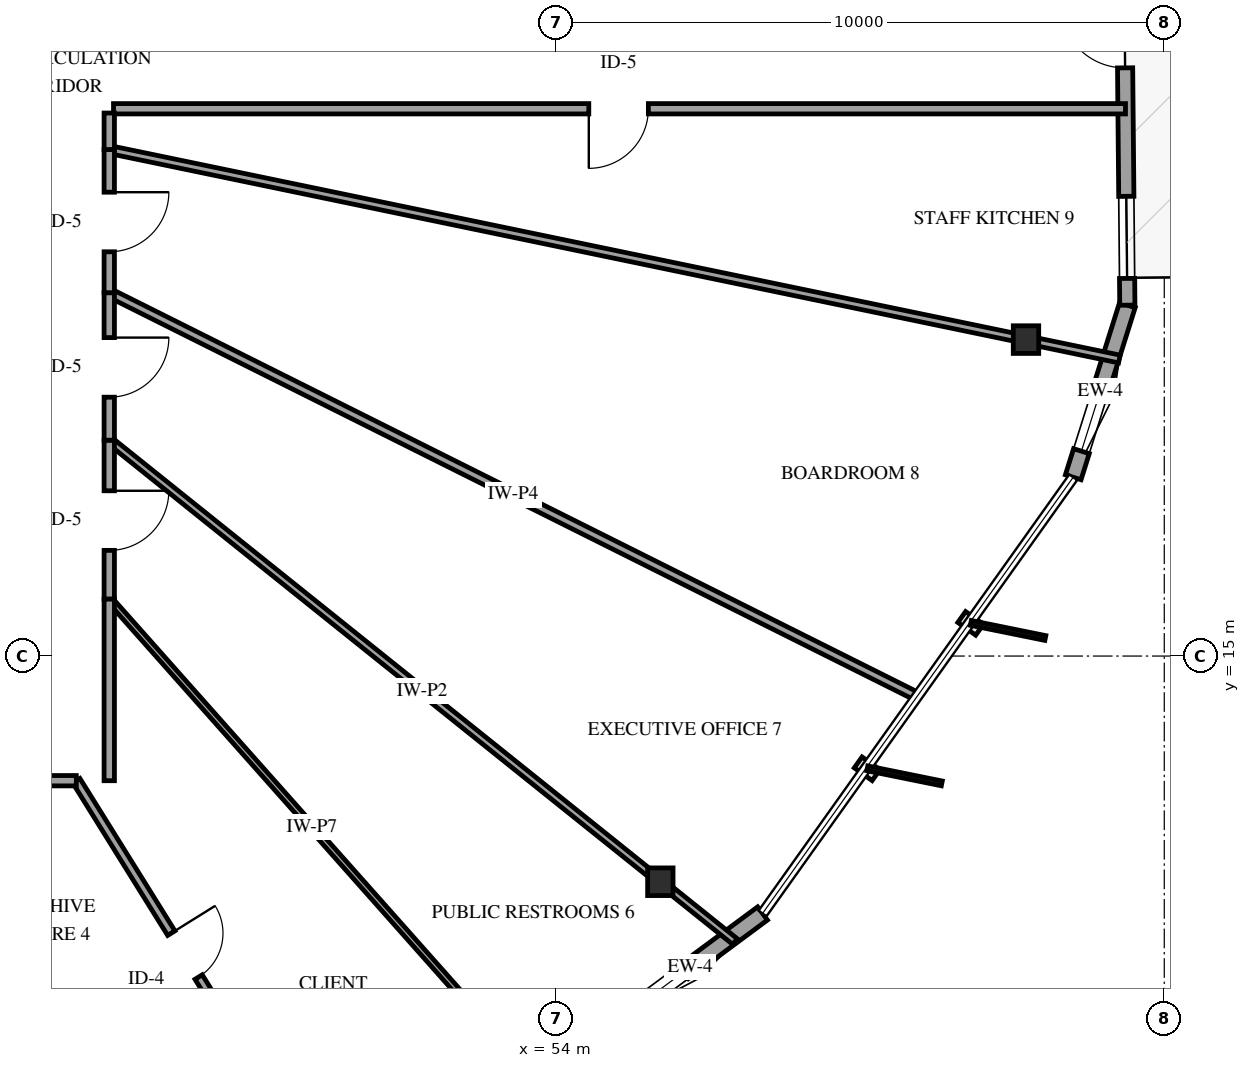
"""IFC4 building model, lengths in metres.
Left out: names, types, materials, properties, quantities, classifications, styles, units other than length and angle.
Written with IfcOpenShell. Run it as: python <this file> out.ifc"""

import sys

from ifc_helpers import new_model, si_unit, direction, frame, frame_2d, origin, origin_2d, place, context, subcontext, project, spatial, rectangle, i_section, extrude, element, fill, save


model = new_model("IFC4")
c1 = context("Model", 3, precision=1e-05, world=origin(), true_north=direction((0.0, 1.0)))
c2 = subcontext(c1, "Body", "Model", "MODEL_VIEW")
j1 = project(units=[si_unit("LENGTHUNIT", "METRE"), si_unit("PLANEANGLEUNIT", "RADIAN")], contexts=[c1])
p1 = place(None, origin())
s1 = spatial("IfcSite", under=j1, at=p1, CompositionType="ELEMENT")
p2 = place(p1, origin())
s2 = spatial("IfcBuilding", under=s1, at=p2, CompositionType="ELEMENT")
p3 = place(p2, frame((0.0, 0.0, 103.0)))
s3 = spatial("IfcBuildingStorey", under=s2, at=p3, CompositionType="ELEMENT", Elevation=103.0)
for number, where, z_axis, x_axis in (
    (1, (55.712, 11.289, 0.0), (0.0, 0.0, 1.0), (1.0, 0.0, 0.0)),
    (2, (61.726, 20.204, 0.0), (0.0, 0.0, 1.0), (1.0, 0.0, 0.0)),
):
    element("IfcColumn", number, at=place(p3, frame(where, z_axis=z_axis, x_axis=x_axis)), inside=s3, PredefinedType="COLUMN", context=c2, shape_type="SweptSolid", body=[
        extrude(i_section(OverallWidth=0.418, OverallDepth=0.455, WebThickness=0.042, FlangeThickness=0.068, FilletRadius=0.038, at=origin_2d()), origin(), (0.0, 0.0, 1.0), 3.9),
    ])
p4 = place(p3, frame((55.01, 9.0, 0.0), z_axis=(0.0, 0.0, 1.0), x_axis=(0.803433261612, 0.595394822059, 0.0)))
e3 = element("IfcWall", 3, at=p4, inside=s3, PredefinedType="SOLIDWALL", context=c2, shape_type="SweptSolid", body=[
    extrude(rectangle(XDim=2.967, YDim=0.27, at=frame_2d((1.483, 0.0))), origin(), (0.0, 0.0, 1.0), 2.979),
])
p5 = place(p4, frame((0.45, 0.0, 0.75)))
e4 = element("IfcOpeningElement", 4, at=p5, cuts=e3, PredefinedType="OPENING", context=c2, shape_type="SweptSolid", body=[
    extrude(rectangle(XDim=0.9, YDim=1.5, at=frame_2d((0.45, 0.75))), frame((0.0, 0.145, 0.0), z_axis=(0.0, -1.0, 0.0), x_axis=(1.0, 0.0, 0.0)), (0.0, 0.0, 1.0), 0.29),
])
p6 = place(p3, frame((62.502, 17.94, 0.0), z_axis=(0.0, 0.0, 1.0), x_axis=(0.300036293242, 0.953927786962, 0.0)))
e5 = element("IfcWall", 5, at=p6, inside=s3, PredefinedType="SOLIDWALL", context=c2, shape_type="SweptSolid", body=[
    extrude(rectangle(XDim=2.967, YDim=0.27, at=frame_2d((1.483, 0.0))), origin(), (0.0, 0.0, 1.0), 2.979),
])
p7 = place(p6, frame((0.45, 0.0, 0.75)))
e6 = element("IfcOpeningElement", 6, at=p7, cuts=e5, PredefinedType="OPENING", context=c2, shape_type="SweptSolid", body=[
    extrude(rectangle(XDim=0.9, YDim=1.5, at=frame_2d((0.45, 0.75))), frame((0.0, 0.145, 0.0), z_axis=(0.0, -1.0, 0.0), x_axis=(1.0, 0.0, 0.0)), (0.0, 0.0, 1.0), 0.29),
])
p8 = place(p3, frame((63.393, 20.77, 0.0), z_axis=(0.0, 0.0, 1.0), x_axis=(-0.009425958451, 0.999955574667, 0.0)))
e7 = element("IfcWall", 7, at=p8, inside=s3, PredefinedType="SOLIDWALL", context=c2, shape_type="SweptSolid", body=[
    extrude(rectangle(XDim=8.806, YDim=0.25, at=frame_2d((4.403, 0.0))), origin(), (0.0, 0.0, 1.0), 2.979),
])
p9 = place(p8, frame((3.903, 0.0, 0.0)))
e8 = element("IfcOpeningElement", 8, at=p9, cuts=e7, PredefinedType="OPENING", context=c2, shape_type="SweptSolid", body=[
    extrude(rectangle(XDim=1.05, YDim=2.15, at=frame_2d((0.525, 1.075))), frame((0.0, 0.135, 0.0), z_axis=(0.0, -1.0, 0.0), x_axis=(1.0, 0.0, 0.0)), (0.0, 0.0, 1.0), 0.27),
])
p10 = place(p8, frame((0.44, 0.0, 0.72)))
e9 = element("IfcOpeningElement", 9, at=p10, cuts=e7, PredefinedType="OPENING", context=c2, shape_type="SweptSolid", body=[
    extrude(rectangle(XDim=1.35, YDim=1.65, at=frame_2d((0.675, 0.825))), frame((0.0, 0.135, 0.0), z_axis=(0.0, -1.0, 0.0), x_axis=(1.0, 0.0, 0.0)), (0.0, 0.0, 1.0), 0.27),
])
p11 = place(p8, frame((5.593, 0.0, 0.72)))
e10 = element("IfcOpeningElement", 10, at=p11, cuts=e7, PredefinedType="OPENING", context=c2, shape_type="SweptSolid", body=[
    extrude(rectangle(XDim=1.35, YDim=1.65, at=frame_2d((0.675, 0.825))), frame((0.0, 0.135, 0.0), z_axis=(0.0, -1.0, 0.0), x_axis=(1.0, 0.0, 0.0)), (0.0, 0.0, 1.0), 0.27),
])
p12 = place(p3, frame((46.65, 23.33, 0.0), z_axis=(0.0, 0.0, 1.0), x_axis=(0.979163326669, -0.203074320649, 0.0)))
e11 = element("IfcWall", 11, at=p12, inside=s3, PredefinedType="PARTITIONING", context=c2, shape_type="SweptSolid", body=[
    extrude(rectangle(XDim=16.965, YDim=0.13, at=frame_2d((8.482, 0.0))), origin(), (0.0, 0.0, 1.0), 2.895),
])
p13 = place(p3, frame((63.362, 24.0, 0.0), z_axis=(0.0, 0.0, 1.0), x_axis=(-1.0, 0.0, 0.0)))
e12 = element("IfcWall", 12, at=p13, inside=s3, PredefinedType="PARTITIONING", context=c2, shape_type="SweptSolid", body=[
    extrude(rectangle(XDim=16.642, YDim=0.17, at=frame_2d((8.321, 0.0))), origin(), (0.0, 0.0, 1.0), 3.6),
])
p14 = place(p13, frame((7.846, 0.0, 0.0)))
e13 = element("IfcOpeningElement", 13, at=p14, cuts=e12, PredefinedType="OPENING", context=c2, shape_type="SweptSolid", body=[
    extrude(rectangle(XDim=0.98, YDim=2.15, at=frame_2d((0.49, 1.075))), frame((0.0, 0.095, 0.0), z_axis=(0.0, -1.0, 0.0), x_axis=(1.0, 0.0, 0.0)), (0.0, 0.0, 1.0), 0.19),
])
p15 = place(p3, frame((46.65, 20.975, 0.0), z_axis=(0.0, 0.0, 1.0), x_axis=(0.894492933533, -0.447082086266, 0.0)))
e14 = element("IfcWall", 14, at=p15, inside=s3, PredefinedType="PARTITIONING", context=c2, shape_type="SweptSolid", body=[
    extrude(rectangle(XDim=14.852, YDim=0.14, at=frame_2d((7.426, 0.0))), origin(), (0.0, 0.0, 1.0), 3.6),
])
p16 = place(p3, frame((46.65, 18.55, 0.0), z_axis=(0.0, 0.0, 1.0), x_axis=(0.780384466618, -0.625299995412, 0.0)))
e15 = element("IfcWall", 15, at=p16, inside=s3, PredefinedType="PARTITIONING", context=c2, shape_type="SweptSolid", body=[
    extrude(rectangle(XDim=13.186, YDim=0.12, at=frame_2d((6.593, 0.0))), origin(), (0.0, 0.0, 1.0), 2.978),
])
p17 = place(p3, frame((46.65, 15.936, 0.0), z_axis=(0.0, 0.0, 1.0), x_axis=(0.664067862616, -0.747672303781, 0.0)))
e16 = element("IfcWall", 16, at=p17, inside=s3, PredefinedType="PARTITIONING", context=c2, shape_type="SweptSolid", body=[
    extrude(rectangle(XDim=10.037, YDim=0.1, at=frame_2d((5.018, 0.0))), origin(), (0.0, 0.0, 1.0), 2.978),
])
p18 = place(p3, frame((43.455, 12.95, 0.0), z_axis=(0.0, 0.0, 1.0), x_axis=(0.373917251642, -0.927462068725, 0.0)))
e17 = element("IfcWall", 17, at=p18, inside=s3, PredefinedType="PARTITIONING", context=c2, shape_type="SweptSolid", body=[
    extrude(rectangle(XDim=7.36, YDim=0.13, at=frame_2d((3.68, 0.0))), origin(), (0.0, 0.0, 1.0), 2.895),
])
p19 = place(p3, frame((46.108, 12.95, 0.0), z_axis=(0.0, 0.0, 1.0), x_axis=(0.528835943062, -0.848724069015, 0.0)))
e18 = element("IfcWall", 18, at=p19, inside=s3, PredefinedType="PARTITIONING", context=c2, shape_type="SweptSolid", body=[
    extrude(rectangle(XDim=6.758, YDim=0.14, at=frame_2d((3.379, 0.0))), origin(), (0.0, 0.0, 1.0), 3.6),
])
p20 = place(p19, frame((2.954, 0.0, 0.0)))
e19 = element("IfcOpeningElement", 19, at=p20, cuts=e18, PredefinedType="OPENING", context=c2, shape_type="SweptSolid", body=[
    extrude(rectangle(XDim=0.85, YDim=2.1, at=frame_2d((0.425, 1.05))), frame((0.0, 0.08, 0.0), z_axis=(0.0, -1.0, 0.0), x_axis=(1.0, 0.0, 0.0)), (0.0, 0.0, 1.0), 0.16),
])
p21 = place(p3, frame((46.108, 12.95, 0.0), z_axis=(0.0, 0.0, 1.0), x_axis=(-1.0, 0.0, 0.0)))
e20 = element("IfcWall", 20, at=p21, inside=s3, PredefinedType="PARTITIONING", context=c2, shape_type="SweptSolid", body=[
    extrude(rectangle(XDim=2.653, YDim=0.17, at=frame_2d((1.326, 0.0))), origin(), (0.0, 0.0, 1.0), 3.6),
])
p22 = place(p21, frame((0.851, 0.0, 0.0)))
e21 = element("IfcOpeningElement", 21, at=p22, cuts=e20, PredefinedType="OPENING", context=c2, shape_type="SweptSolid", body=[
    extrude(rectangle(XDim=0.98, YDim=2.15, at=frame_2d((0.49, 1.075))), frame((0.0, 0.095, 0.0), z_axis=(0.0, -1.0, 0.0), x_axis=(1.0, 0.0, 0.0)), (0.0, 0.0, 1.0), 0.19),
])
p23 = place(p3, frame((46.65, 18.55, 0.0), z_axis=(0.0, 0.0, 1.0), x_axis=(0.0, -1.0, 0.0)))
e22 = element("IfcWall", 22, at=p23, inside=s3, PredefinedType="PARTITIONING", context=c2, shape_type="SweptSolid", body=[
    extrude(rectangle(XDim=2.614, YDim=0.17, at=frame_2d((1.307, 0.0))), origin(), (0.0, 0.0, 1.0), 3.6),
])
p24 = place(p23, frame((0.832, 0.0, 0.0)))
e23 = element("IfcOpeningElement", 23, at=p24, cuts=e22, PredefinedType="OPENING", context=c2, shape_type="SweptSolid", body=[
    extrude(rectangle(XDim=0.98, YDim=2.15, at=frame_2d((0.49, 1.075))), frame((0.0, 0.095, 0.0), z_axis=(0.0, -1.0, 0.0), x_axis=(1.0, 0.0, 0.0)), (0.0, 0.0, 1.0), 0.19),
])
p25 = place(p3, frame((46.65, 20.975, 0.0), z_axis=(0.0, 0.0, 1.0), x_axis=(0.0, -1.0, 0.0)))
e24 = element("IfcWall", 24, at=p25, inside=s3, PredefinedType="PARTITIONING", context=c2, shape_type="SweptSolid", body=[
    extrude(rectangle(XDim=2.425, YDim=0.17, at=frame_2d((1.212, 0.0))), origin(), (0.0, 0.0, 1.0), 3.6),
])
p26 = place(p25, frame((0.738, 0.0, 0.0)))
e25 = element("IfcOpeningElement", 25, at=p26, cuts=e24, PredefinedType="OPENING", context=c2, shape_type="SweptSolid", body=[
    extrude(rectangle(XDim=0.98, YDim=2.15, at=frame_2d((0.49, 1.075))), frame((0.0, 0.095, 0.0), z_axis=(0.0, -1.0, 0.0), x_axis=(1.0, 0.0, 0.0)), (0.0, 0.0, 1.0), 0.19),
])
p27 = place(p3, frame((46.65, 23.33, 0.0), z_axis=(0.0, 0.0, 1.0), x_axis=(0.0, -1.0, 0.0)))
e26 = element("IfcWall", 26, at=p27, inside=s3, PredefinedType="PARTITIONING", context=c2, shape_type="SweptSolid", body=[
    extrude(rectangle(XDim=2.355, YDim=0.17, at=frame_2d((1.177, 0.0))), origin(), (0.0, 0.0, 1.0), 3.6),
])
p28 = place(p27, frame((0.702, 0.0, 0.0)))
e27 = element("IfcOpeningElement", 27, at=p28, cuts=e26, PredefinedType="OPENING", context=c2, shape_type="SweptSolid", body=[
    extrude(rectangle(XDim=0.98, YDim=2.15, at=frame_2d((0.49, 1.075))), frame((0.0, 0.095, 0.0), z_axis=(0.0, -1.0, 0.0), x_axis=(1.0, 0.0, 0.0)), (0.0, 0.0, 1.0), 0.19),
])
p29 = place(p3, frame((46.65, 23.93, 0.0), z_axis=(0.0, 0.0, 1.0), x_axis=(0.0, -1.0, 0.0)))
e28 = element("IfcWall", 28, at=p29, inside=s3, PredefinedType="PARTITIONING", context=c2, shape_type="SweptSolid", body=[
    extrude(rectangle(XDim=0.6, YDim=0.17, at=frame_2d((0.3, 0.0))), origin(), (0.0, 0.0, 1.0), 3.6),
])
p30 = place(p3, frame((46.65, 15.936, 0.0), z_axis=(0.0, 0.0, 1.0), x_axis=(0.0, -1.0, 0.0)))
e29 = element("IfcWall", 29, at=p30, inside=s3, PredefinedType="PARTITIONING", context=c2, shape_type="SweptSolid", body=[
    extrude(rectangle(XDim=2.986, YDim=0.17, at=frame_2d((1.493, 0.0))), origin(), (0.0, 0.0, 1.0), 3.6),
])
p31 = place(p5, origin())
e30 = element("IfcWindow", 30, at=p31, inside=s3, PartitioningType="SINGLE_PANEL", PredefinedType="WINDOW", context=c2, shape_type="SweptSolid", body=[
    extrude(rectangle(XDim=0.9, YDim=1.5, at=frame_2d((0.45, 0.75))), frame((0.0, 0.03, 0.0), z_axis=(0.0, -1.0, 0.0), x_axis=(1.0, 0.0, 0.0)), (0.0, 0.0, 1.0), 0.06),
])
fill(e4, e30)
p32 = place(p7, origin())
e31 = element("IfcWindow", 31, at=p32, inside=s3, PartitioningType="SINGLE_PANEL", PredefinedType="WINDOW", context=c2, shape_type="SweptSolid", body=[
    extrude(rectangle(XDim=0.9, YDim=1.5, at=frame_2d((0.45, 0.75))), frame((0.0, 0.03, 0.0), z_axis=(0.0, -1.0, 0.0), x_axis=(1.0, 0.0, 0.0)), (0.0, 0.0, 1.0), 0.06),
])
fill(e6, e31)
p33 = place(p9, origin())
e32 = element("IfcDoor", 32, at=p33, inside=s3, OperationType="SINGLE_SWING_RIGHT", PredefinedType="DOOR", context=c2, shape_type="SweptSolid", body=[
    extrude(rectangle(XDim=1.05, YDim=2.15, at=frame_2d((0.525, 1.075))), frame((0.0, 0.025, 0.0), z_axis=(0.0, -1.0, 0.0), x_axis=(1.0, 0.0, 0.0)), (0.0, 0.0, 1.0), 0.05),
])
fill(e8, e32)
p34 = place(p10, origin())
e33 = element("IfcWindow", 33, at=p34, inside=s3, PartitioningType="SINGLE_PANEL", PredefinedType="WINDOW", context=c2, shape_type="SweptSolid", body=[
    extrude(rectangle(XDim=1.35, YDim=1.65, at=frame_2d((0.675, 0.825))), frame((0.0, 0.03, 0.0), z_axis=(0.0, -1.0, 0.0), x_axis=(1.0, 0.0, 0.0)), (0.0, 0.0, 1.0), 0.06),
])
fill(e9, e33)
p35 = place(p14, origin())
e34 = element("IfcDoor", 34, at=p35, inside=s3, OperationType="SINGLE_SWING_RIGHT", PredefinedType="DOOR", context=c2, shape_type="SweptSolid", body=[
    extrude(rectangle(XDim=0.98, YDim=2.15, at=frame_2d((0.49, 1.075))), frame((0.0, 0.025, 0.0), z_axis=(0.0, -1.0, 0.0), x_axis=(1.0, 0.0, 0.0)), (0.0, 0.0, 1.0), 0.05),
])
fill(e13, e34)
p36 = place(p20, origin())
e35 = element("IfcDoor", 35, at=p36, inside=s3, OperationType="SINGLE_SWING_LEFT", PredefinedType="DOOR", context=c2, shape_type="SweptSolid", body=[
    extrude(rectangle(XDim=0.85, YDim=2.1, at=frame_2d((0.425, 1.05))), frame((0.0, 0.025, 0.0), z_axis=(0.0, -1.0, 0.0), x_axis=(1.0, 0.0, 0.0)), (0.0, 0.0, 1.0), 0.05),
])
fill(e19, e35)
p37 = place(p24, origin())
e36 = element("IfcDoor", 36, at=p37, inside=s3, OperationType="SINGLE_SWING_LEFT", PredefinedType="DOOR", context=c2, shape_type="SweptSolid", body=[
    extrude(rectangle(XDim=0.98, YDim=2.15, at=frame_2d((0.49, 1.075))), frame((0.0, 0.025, 0.0), z_axis=(0.0, -1.0, 0.0), x_axis=(1.0, 0.0, 0.0)), (0.0, 0.0, 1.0), 0.05),
])
fill(e23, e36)
p38 = place(p26, origin())
e37 = element("IfcDoor", 37, at=p38, inside=s3, OperationType="SINGLE_SWING_LEFT", PredefinedType="DOOR", context=c2, shape_type="SweptSolid", body=[
    extrude(rectangle(XDim=0.98, YDim=2.15, at=frame_2d((0.49, 1.075))), frame((0.0, 0.025, 0.0), z_axis=(0.0, -1.0, 0.0), x_axis=(1.0, 0.0, 0.0)), (0.0, 0.0, 1.0), 0.05),
])
fill(e25, e37)
p39 = place(p28, origin())
e38 = element("IfcDoor", 38, at=p39, inside=s3, OperationType="SINGLE_SWING_LEFT", PredefinedType="DOOR", context=c2, shape_type="SweptSolid", body=[
    extrude(rectangle(XDim=0.98, YDim=2.15, at=frame_2d((0.49, 1.075))), frame((0.0, 0.025, 0.0), z_axis=(0.0, -1.0, 0.0), x_axis=(1.0, 0.0, 0.0)), (0.0, 0.0, 1.0), 0.05),
])
fill(e27, e38)
save(model, sys.argv[1])
